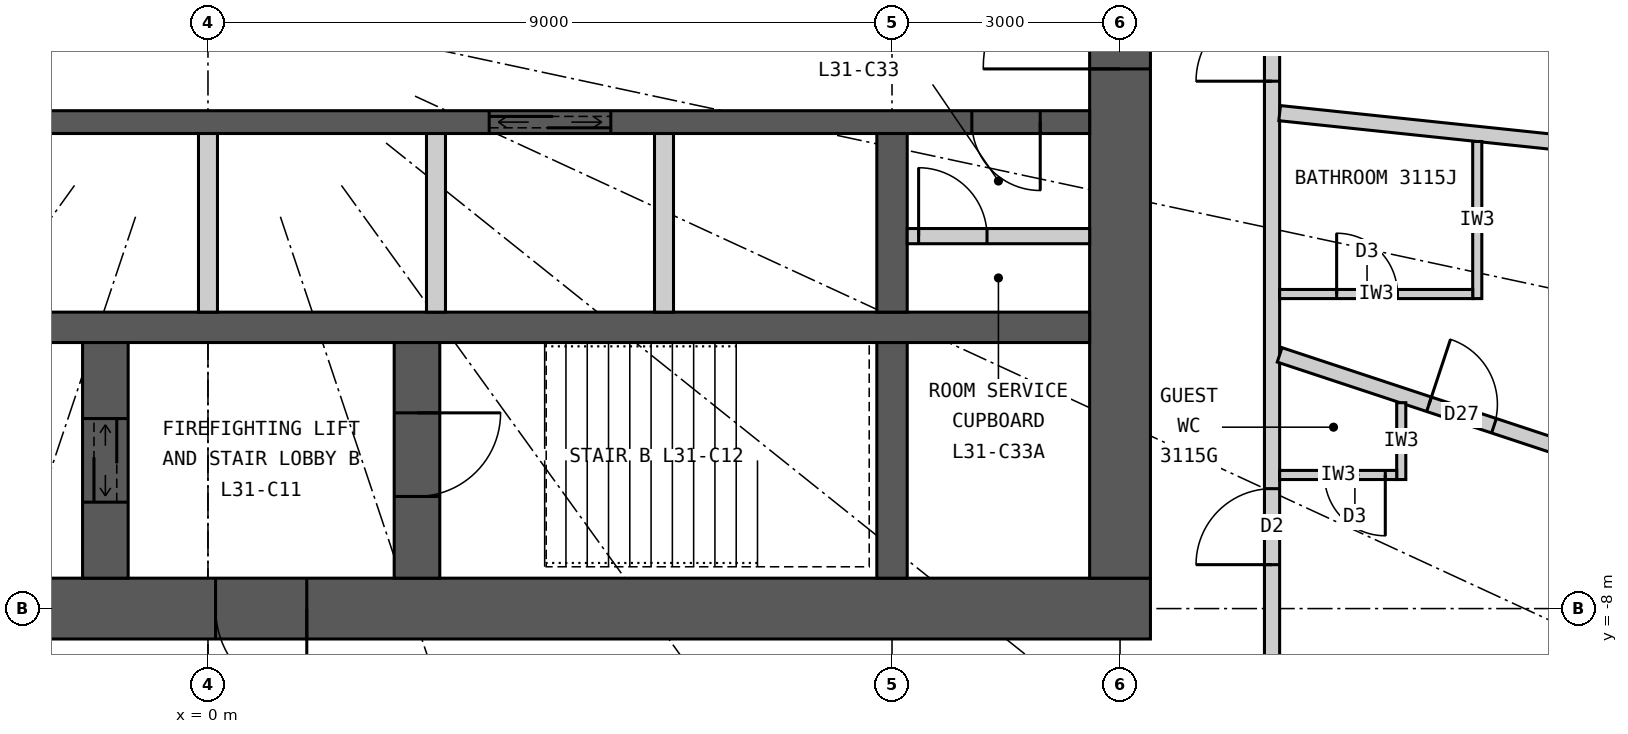
"""IFC4 building model, lengths in metres.
Left out: names, types, materials, properties, quantities, classifications, styles, units other than length and angle.
Written with IfcOpenShell. Run it as: python <this file> out.ifc"""

import sys

from ifc_helpers import new_model, si_unit, direction, frame, frame_2d, origin, place, context, subcontext, project, spatial, rectangle, extrude, element, fill, save


model = new_model("IFC4")
c1 = context("Model", 3, precision=1e-05, world=origin(), true_north=direction((0.0, 1.0)))
c2 = subcontext(c1, "Body", "Model", "MODEL_VIEW")
j1 = project(units=[si_unit("LENGTHUNIT", "METRE"), si_unit("PLANEANGLEUNIT", "RADIAN")], contexts=[c1])
p1 = place(None, origin())
s1 = spatial("IfcSite", under=j1, at=p1, CompositionType="ELEMENT")
p2 = place(p1, origin())
s2 = spatial("IfcBuilding", under=s1, at=p2, CompositionType="ELEMENT")
p3 = place(p2, frame((0.0, 0.0, 122.1)))
s3 = spatial("IfcBuildingStorey", under=s2, at=p3, CompositionType="ELEMENT", Elevation=122.1)
p4 = place(p3, frame((12.4, -8.0, 0.0), z_axis=(0.0, 0.0, 1.0), x_axis=(-1.0, 0.0, 0.0)))
e1 = element("IfcWall", 1, at=p4, inside=s3, PredefinedType="SHEAR", context=c2, shape_type="SweptSolid", body=[
    extrude(rectangle(XDim=24.8, YDim=0.8, at=frame_2d((12.4, 0.0))), origin(), (0.0, 0.0, 1.0), 3.3),
])
p5 = place(p4, frame((11.1, 0.0, 0.0)))
e2 = element("IfcOpeningElement", 2, at=p5, cuts=e1, PredefinedType="OPENING", context=c2, shape_type="SweptSolid", body=[
    extrude(rectangle(XDim=1.2, YDim=2.2, at=frame_2d((0.6, 1.1))), frame((0.0, 0.41, 0.0), z_axis=(0.0, -1.0, 0.0), x_axis=(1.0, 0.0, 0.0)), (0.0, 0.0, 1.0), 0.82),
])
p6 = place(p4, frame((18.7, 0.0, 0.0)))
e3 = element("IfcOpeningElement", 3, at=p6, cuts=e1, PredefinedType="OPENING", context=c2, shape_type="SweptSolid", body=[
    extrude(rectangle(XDim=0.9, YDim=2.2, at=frame_2d((0.45, 1.1))), frame((0.0, 0.41, 0.0), z_axis=(0.0, -1.0, 0.0), x_axis=(1.0, 0.0, 0.0)), (0.0, 0.0, 1.0), 0.82),
])
p7 = place(p3, frame((12.0, -7.6, 0.0), z_axis=(0.0, 0.0, 1.0), x_axis=(0.0, 1.0, 0.0)))
e4 = element("IfcWall", 4, at=p7, inside=s3, PredefinedType="SHEAR", context=c2, shape_type="SweptSolid", body=[
    extrude(rectangle(XDim=15.2, YDim=0.8, at=frame_2d((7.6, 0.0))), origin(), (0.0, 0.0, 1.0), 3.3),
])
p8 = place(p7, frame((6.7, 0.0, 0.0)))
e5 = element("IfcOpeningElement", 5, at=p8, cuts=e4, PredefinedType="OPENING", context=c2, shape_type="SweptSolid", body=[
    extrude(rectangle(XDim=1.8, YDim=2.2, at=frame_2d((0.9, 1.1))), frame((0.0, 0.41, 0.0), z_axis=(0.0, -1.0, 0.0), x_axis=(1.0, 0.0, 0.0)), (0.0, 0.0, 1.0), 0.82),
])
p9 = place(p3, frame((-11.6, -4.3, 0.0), z_axis=(0.0, 0.0, 1.0), x_axis=(1.0, 0.0, 0.0)))
e6 = element("IfcWall", 6, at=p9, inside=s3, PredefinedType="SHEAR", context=c2, shape_type="SweptSolid", body=[
    extrude(rectangle(XDim=23.2, YDim=0.4, at=frame_2d((11.6, 0.0))), origin(), (0.0, 0.0, 1.0), 3.3),
])
p10 = place(p3, frame((-11.6, -1.6, 0.0), z_axis=(0.0, 0.0, 1.0), x_axis=(1.0, 0.0, 0.0)))
e7 = element("IfcWall", 7, at=p10, inside=s3, PredefinedType="SHEAR", context=c2, shape_type="SweptSolid", body=[
    extrude(rectangle(XDim=23.2, YDim=0.3, at=frame_2d((11.6, 0.0))), origin(), (0.0, 0.0, 1.0), 3.3),
])
p11 = place(p10, frame((6.55, 0.0, 0.0)))
e8 = element("IfcOpeningElement", 8, at=p11, cuts=e7, PredefinedType="OPENING", context=c2, shape_type="SweptSolid", body=[
    extrude(rectangle(XDim=1.1, YDim=2.2, at=frame_2d((0.55, 1.1))), frame((0.0, 0.16, 0.0), z_axis=(0.0, -1.0, 0.0), x_axis=(1.0, 0.0, 0.0)), (0.0, 0.0, 1.0), 0.32),
])
p12 = place(p10, frame((15.3, 0.0, 0.0)))
e9 = element("IfcOpeningElement", 9, at=p12, cuts=e7, PredefinedType="OPENING", context=c2, shape_type="SweptSolid", body=[
    extrude(rectangle(XDim=1.6, YDim=2.4, at=frame_2d((0.8, 1.2))), frame((0.0, 0.16, 0.0), z_axis=(0.0, -1.0, 0.0), x_axis=(1.0, 0.0, 0.0)), (0.0, 0.0, 1.0), 0.32),
])
p13 = place(p10, frame((0.65, 0.0, 0.0)))
e10 = element("IfcOpeningElement", 10, at=p13, cuts=e7, PredefinedType="OPENING", context=c2, shape_type="SweptSolid", body=[
    extrude(rectangle(XDim=0.9, YDim=2.2, at=frame_2d((0.45, 1.1))), frame((0.0, 0.16, 0.0), z_axis=(0.0, -1.0, 0.0), x_axis=(1.0, 0.0, 0.0)), (0.0, 0.0, 1.0), 0.32),
])
p14 = place(p10, frame((3.65, 0.0, 0.0)))
e11 = element("IfcOpeningElement", 11, at=p14, cuts=e7, PredefinedType="OPENING", context=c2, shape_type="SweptSolid", body=[
    extrude(rectangle(XDim=0.9, YDim=2.2, at=frame_2d((0.45, 1.1))), frame((0.0, 0.16, 0.0), z_axis=(0.0, -1.0, 0.0), x_axis=(1.0, 0.0, 0.0)), (0.0, 0.0, 1.0), 0.32),
])
p15 = place(p10, frame((21.65, 0.0, 0.0)))
e12 = element("IfcOpeningElement", 12, at=p15, cuts=e7, PredefinedType="OPENING", context=c2, shape_type="SweptSolid", body=[
    extrude(rectangle(XDim=0.9, YDim=2.2, at=frame_2d((0.45, 1.1))), frame((0.0, 0.16, 0.0), z_axis=(0.0, -1.0, 0.0), x_axis=(1.0, 0.0, 0.0)), (0.0, 0.0, 1.0), 0.32),
])
p16 = place(p3, frame((9.0, -4.1, 0.0), z_axis=(0.0, 0.0, 1.0), x_axis=(0.0, 1.0, 0.0)))
e13 = element("IfcWall", 13, at=p16, inside=s3, PredefinedType="SHEAR", context=c2, shape_type="SweptSolid", body=[
    extrude(rectangle(XDim=2.35, YDim=0.4, at=frame_2d((1.175, 0.0))), origin(), (0.0, 0.0, 1.0), 3.3),
])
p17 = place(p3, frame((9.0, -7.6, 0.0), z_axis=(0.0, 0.0, 1.0), x_axis=(0.0, 1.0, 0.0)))
e14 = element("IfcWall", 14, at=p17, inside=s3, PredefinedType="SHEAR", context=c2, shape_type="SweptSolid", body=[
    extrude(rectangle(XDim=3.1, YDim=0.4, at=frame_2d((1.55, 0.0))), origin(), (0.0, 0.0, 1.0), 3.3),
])
p18 = place(p3, frame((2.75, -7.6, 0.0), z_axis=(0.0, 0.0, 1.0), x_axis=(0.0, 1.0, 0.0)))
e15 = element("IfcWall", 15, at=p18, inside=s3, PredefinedType="SHEAR", context=c2, shape_type="SweptSolid", body=[
    extrude(rectangle(XDim=3.1, YDim=0.6, at=frame_2d((1.55, 0.0))), origin(), (0.0, 0.0, 1.0), 3.3),
])
p19 = place(p18, frame((1.075, 0.0, 0.0)))
e16 = element("IfcOpeningElement", 16, at=p19, cuts=e15, PredefinedType="OPENING", context=c2, shape_type="SweptSolid", body=[
    extrude(rectangle(XDim=1.1, YDim=2.2, at=frame_2d((0.55, 1.1))), frame((0.0, 0.31, 0.0), z_axis=(0.0, -1.0, 0.0), x_axis=(1.0, 0.0, 0.0)), (0.0, 0.0, 1.0), 0.62),
])
p20 = place(p3, frame((-1.35, -7.6, 0.0), z_axis=(0.0, 0.0, 1.0), x_axis=(0.0, 1.0, 0.0)))
e17 = element("IfcWall", 17, at=p20, inside=s3, PredefinedType="SHEAR", context=c2, shape_type="SweptSolid", body=[
    extrude(rectangle(XDim=3.1, YDim=0.6, at=frame_2d((1.55, 0.0))), origin(), (0.0, 0.0, 1.0), 3.3),
])
p21 = place(p20, frame((1.0, 0.0, 0.0)))
e18 = element("IfcOpeningElement", 18, at=p21, cuts=e17, PredefinedType="OPENING", context=c2, shape_type="SweptSolid", body=[
    extrude(rectangle(XDim=1.1, YDim=2.2, at=frame_2d((0.55, 1.1))), frame((0.0, 0.31, 0.0), z_axis=(0.0, -1.0, 0.0), x_axis=(1.0, 0.0, 0.0)), (0.0, 0.0, 1.0), 0.62),
])
for number, where, z_axis, x_axis in (
    (19, (0.0, -4.1, 0.0), (0.0, 0.0, 1.0), (0.0, 1.0, 0.0)),
    (20, (3.0, -4.1, 0.0), (0.0, 0.0, 1.0), (0.0, 1.0, 0.0)),
    (21, (6.0, -4.1, 0.0), (0.0, 0.0, 1.0), (0.0, 1.0, 0.0)),
):
    element("IfcWall", number, at=place(p3, frame(where, z_axis=z_axis, x_axis=x_axis)), inside=s3, PredefinedType="PARTITIONING", context=c2, shape_type="SweptSolid", body=[
        extrude(rectangle(XDim=2.35, YDim=0.25, at=frame_2d((1.175, 0.0))), origin(), (0.0, 0.0, 1.0), 3.3),
    ])
p22 = place(p3, frame((14.0, -9.9, 0.0), z_axis=(0.0, 0.0, 1.0), x_axis=(0.0, 1.0, 0.0)))
e22 = element("IfcWall", 22, at=p22, inside=s3, PredefinedType="PARTITIONING", context=c2, shape_type="SweptSolid", body=[
    extrude(rectangle(XDim=19.8, YDim=0.2, at=frame_2d((9.9, 0.0))), origin(), (0.0, 0.0, 1.0), 3.12),
])
p23 = place(p22, frame((2.478, 0.0, 0.0)))
e23 = element("IfcOpeningElement", 23, at=p23, cuts=e22, PredefinedType="OPENING", context=c2, shape_type="SweptSolid", body=[
    extrude(rectangle(XDim=1.0, YDim=2.2, at=frame_2d((0.5, 1.1))), frame((0.0, 0.11, 0.0), z_axis=(0.0, -1.0, 0.0), x_axis=(1.0, 0.0, 0.0)), (0.0, 0.0, 1.0), 0.22),
])
p24 = place(p22, frame((8.838, 0.0, 0.0)))
e24 = element("IfcOpeningElement", 24, at=p24, cuts=e22, PredefinedType="OPENING", context=c2, shape_type="SweptSolid", body=[
    extrude(rectangle(XDim=1.0, YDim=2.2, at=frame_2d((0.5, 1.1))), frame((0.0, 0.11, 0.0), z_axis=(0.0, -1.0, 0.0), x_axis=(1.0, 0.0, 0.0)), (0.0, 0.0, 1.0), 0.22),
])
p25 = place(p22, frame((13.742, 0.0, 0.0)))
e25 = element("IfcOpeningElement", 25, at=p25, cuts=e22, PredefinedType="OPENING", context=c2, shape_type="SweptSolid", body=[
    extrude(rectangle(XDim=1.0, YDim=2.2, at=frame_2d((0.5, 1.1))), frame((0.0, 0.11, 0.0), z_axis=(0.0, -1.0, 0.0), x_axis=(1.0, 0.0, 0.0)), (0.0, 0.0, 1.0), 0.22),
])
p26 = place(p22, frame((18.698, 0.0, 0.0)))
e26 = element("IfcOpeningElement", 26, at=p26, cuts=e22, PredefinedType="OPENING", context=c2, shape_type="SweptSolid", body=[
    extrude(rectangle(XDim=1.0, YDim=2.2, at=frame_2d((0.5, 1.1))), frame((0.0, 0.11, 0.0), z_axis=(0.0, -1.0, 0.0), x_axis=(1.0, 0.0, 0.0)), (0.0, 0.0, 1.0), 0.22),
])
p27 = place(p3, frame((14.1, -4.662, 0.0), z_axis=(0.0, 0.0, 1.0), x_axis=(0.949446466373, -0.313928984789, 0.0)))
e27 = element("IfcWall", 27, at=p27, inside=s3, PredefinedType="PARTITIONING", context=c2, shape_type="SweptSolid", body=[
    extrude(rectangle(XDim=8.797, YDim=0.2, at=frame_2d((4.399, 0.0))), origin(), (0.0, 0.0, 1.0), 3.12),
])
p28 = place(p27, frame((2.07, 0.0, 0.0)))
e28 = element("IfcOpeningElement", 28, at=p28, cuts=e27, PredefinedType="OPENING", context=c2, shape_type="SweptSolid", body=[
    extrude(rectangle(XDim=0.9, YDim=2.1, at=frame_2d((0.45, 1.05))), frame((0.0, 0.11, 0.0), z_axis=(0.0, -1.0, 0.0), x_axis=(1.0, 0.0, 0.0)), (0.0, 0.0, 1.0), 0.22),
])
p29 = place(p3, frame((14.1, -1.482, 0.0), z_axis=(0.0, 0.0, 1.0), x_axis=(0.994523202615, -0.104516024894, 0.0)))
e29 = element("IfcWall", 29, at=p29, inside=s3, PredefinedType="PARTITIONING", context=c2, shape_type="SweptSolid", body=[
    extrude(rectangle(XDim=10.091, YDim=0.2, at=frame_2d((5.045, 0.0))), origin(), (0.0, 0.0, 1.0), 2.47),
])
p30 = place(p3, frame((15.7, -5.291, 0.0), z_axis=(0.0, 0.0, 1.0), x_axis=(0.0, -1.0, 0.0)))
e30 = element("IfcWall", 30, at=p30, inside=s3, PredefinedType="PARTITIONING", context=c2, shape_type="SweptSolid", body=[
    extrude(rectangle(XDim=1.011, YDim=0.12, at=frame_2d((0.505, 0.0))), origin(), (0.0, 0.0, 1.0), 3.12),
])
p31 = place(p3, frame((14.1, -6.242, 0.0), z_axis=(0.0, 0.0, 1.0), x_axis=(1.0, 0.0, 0.0)))
e31 = element("IfcWall", 31, at=p31, inside=s3, PredefinedType="PARTITIONING", context=c2, shape_type="SweptSolid", body=[
    extrude(rectangle(XDim=1.54, YDim=0.12, at=frame_2d((0.77, 0.0))), origin(), (0.0, 0.0, 1.0), 3.12),
])
p32 = place(p31, frame((0.59, 0.0, 0.0)))
e32 = element("IfcOpeningElement", 32, at=p32, cuts=e31, PredefinedType="OPENING", context=c2, shape_type="SweptSolid", body=[
    extrude(rectangle(XDim=0.8, YDim=2.1, at=frame_2d((0.4, 1.05))), frame((0.0, 0.07, 0.0), z_axis=(0.0, -1.0, 0.0), x_axis=(1.0, 0.0, 0.0)), (0.0, 0.0, 1.0), 0.14),
])
p33 = place(p3, frame((16.7, -1.855, 0.0), z_axis=(0.0, 0.0, 1.0), x_axis=(0.0, -1.0, 0.0)))
e33 = element("IfcWall", 33, at=p33, inside=s3, PredefinedType="PARTITIONING", context=c2, shape_type="SweptSolid", body=[
    extrude(rectangle(XDim=2.067, YDim=0.12, at=frame_2d((1.033, 0.0))), origin(), (0.0, 0.0, 1.0), 3.12),
])
p34 = place(p3, frame((14.1, -3.862, 0.0), z_axis=(0.0, 0.0, 1.0), x_axis=(1.0, 0.0, 0.0)))
e34 = element("IfcWall", 34, at=p34, inside=s3, PredefinedType="PARTITIONING", context=c2, shape_type="SweptSolid", body=[
    extrude(rectangle(XDim=2.54, YDim=0.12, at=frame_2d((1.27, 0.0))), origin(), (0.0, 0.0, 1.0), 2.37),
])
p35 = place(p34, frame((0.75, 0.0, 0.0)))
e35 = element("IfcOpeningElement", 35, at=p35, cuts=e34, PredefinedType="OPENING", context=c2, shape_type="SweptSolid", body=[
    extrude(rectangle(XDim=0.8, YDim=2.1, at=frame_2d((0.4, 1.05))), frame((0.0, 0.07, 0.0), z_axis=(0.0, -1.0, 0.0), x_axis=(1.0, 0.0, 0.0)), (0.0, 0.0, 1.0), 0.14),
])
p36 = place(p3, frame((9.2, -3.1, 0.0), z_axis=(0.0, 0.0, 1.0), x_axis=(1.0, 0.0, 0.0)))
e36 = element("IfcWall", 36, at=p36, inside=s3, PredefinedType="PARTITIONING", context=c2, shape_type="SweptSolid", body=[
    extrude(rectangle(XDim=2.4, YDim=0.2, at=frame_2d((1.2, 0.0))), origin(), (0.0, 0.0, 1.0), 3.12),
])
p37 = place(p36, frame((0.15, 0.0, 0.0)))
e37 = element("IfcOpeningElement", 37, at=p37, cuts=e36, PredefinedType="OPENING", context=c2, shape_type="SweptSolid", body=[
    extrude(rectangle(XDim=0.9, YDim=2.2, at=frame_2d((0.45, 1.1))), frame((0.0, 0.11, 0.0), z_axis=(0.0, -1.0, 0.0), x_axis=(1.0, 0.0, 0.0)), (0.0, 0.0, 1.0), 0.22),
])
p38 = place(p32, origin())
e38 = element("IfcDoor", 38, at=p38, inside=s3, OperationType="SINGLE_SWING_RIGHT", PredefinedType="DOOR", context=c2, shape_type="SweptSolid", body=[
    extrude(rectangle(XDim=0.8, YDim=2.1, at=frame_2d((0.4, 1.05))), frame((0.0, 0.025, 0.0), z_axis=(0.0, -1.0, 0.0), x_axis=(1.0, 0.0, 0.0)), (0.0, 0.0, 1.0), 0.05),
])
fill(e32, e38)
p39 = place(p23, origin())
e39 = element("IfcDoor", 39, at=p39, inside=s3, OperationType="SINGLE_SWING_LEFT", PredefinedType="DOOR", context=c2, shape_type="SweptSolid", body=[
    extrude(rectangle(XDim=1.0, YDim=2.2, at=frame_2d((0.5, 1.1))), frame((0.0, 0.025, 0.0), z_axis=(0.0, -1.0, 0.0), x_axis=(1.0, 0.0, 0.0)), (0.0, 0.0, 1.0), 0.05),
])
fill(e23, e39)
p40 = place(p35, origin())
e40 = element("IfcDoor", 40, at=p40, inside=s3, OperationType="SINGLE_SWING_LEFT", PredefinedType="DOOR", context=c2, shape_type="SweptSolid", body=[
    extrude(rectangle(XDim=0.8, YDim=2.1, at=frame_2d((0.4, 1.05))), frame((0.0, 0.025, 0.0), z_axis=(0.0, -1.0, 0.0), x_axis=(1.0, 0.0, 0.0)), (0.0, 0.0, 1.0), 0.05),
])
fill(e35, e40)
p41 = place(p28, origin())
e41 = element("IfcDoor", 41, at=p41, inside=s3, OperationType="SINGLE_SWING_LEFT", PredefinedType="DOOR", context=c2, shape_type="SweptSolid", body=[
    extrude(rectangle(XDim=0.9, YDim=2.1, at=frame_2d((0.45, 1.05))), frame((0.0, 0.025, 0.0), z_axis=(0.0, -1.0, 0.0), x_axis=(1.0, 0.0, 0.0)), (0.0, 0.0, 1.0), 0.05),
])
fill(e28, e41)
p42 = place(p24, origin())
e42 = element("IfcDoor", 42, at=p42, inside=s3, OperationType="SINGLE_SWING_LEFT", PredefinedType="DOOR", context=c2, shape_type="SweptSolid", body=[
    extrude(rectangle(XDim=1.0, YDim=2.2, at=frame_2d((0.5, 1.1))), frame((0.0, 0.025, 0.0), z_axis=(0.0, -1.0, 0.0), x_axis=(1.0, 0.0, 0.0)), (0.0, 0.0, 1.0), 0.05),
])
fill(e24, e42)
p43 = place(p5, origin())
e43 = element("IfcDoor", 43, at=p43, inside=s3, OperationType="SINGLE_SWING_LEFT", PredefinedType="DOOR", context=c2, shape_type="SweptSolid", body=[
    extrude(rectangle(XDim=1.2, YDim=2.2, at=frame_2d((0.6, 1.1))), frame((0.0, 0.025, 0.0), z_axis=(0.0, -1.0, 0.0), x_axis=(1.0, 0.0, 0.0)), (0.0, 0.0, 1.0), 0.05),
])
fill(e2, e43)
p44 = place(p19, origin())
e44 = element("IfcDoor", 44, at=p44, inside=s3, OperationType="SINGLE_SWING_RIGHT", PredefinedType="DOOR", context=c2, shape_type="SweptSolid", body=[
    extrude(rectangle(XDim=1.1, YDim=2.2, at=frame_2d((0.55, 1.1))), frame((0.0, 0.025, 0.0), z_axis=(0.0, -1.0, 0.0), x_axis=(1.0, 0.0, 0.0)), (0.0, 0.0, 1.0), 0.05),
])
fill(e16, e44)
p45 = place(p21, origin())
e45 = element("IfcDoor", 45, at=p45, inside=s3, OperationType="DOUBLE_DOOR_SLIDING", PredefinedType="DOOR", context=c2, shape_type="SweptSolid", body=[
    extrude(rectangle(XDim=1.1, YDim=2.2, at=frame_2d((0.55, 1.1))), frame((0.0, 0.025, 0.0), z_axis=(0.0, -1.0, 0.0), x_axis=(1.0, 0.0, 0.0)), (0.0, 0.0, 1.0), 0.05),
])
fill(e18, e45)
p46 = place(p12, origin())
e46 = element("IfcDoor", 46, at=p46, inside=s3, OperationType="DOUBLE_DOOR_SLIDING", PredefinedType="DOOR", context=c2, shape_type="SweptSolid", body=[
    extrude(rectangle(XDim=1.6, YDim=2.4, at=frame_2d((0.8, 1.2))), frame((0.0, 0.025, 0.0), z_axis=(0.0, -1.0, 0.0), x_axis=(1.0, 0.0, 0.0)), (0.0, 0.0, 1.0), 0.05),
])
fill(e9, e46)
p47 = place(p15, origin())
e47 = element("IfcDoor", 47, at=p47, inside=s3, OperationType="SINGLE_SWING_RIGHT", PredefinedType="DOOR", context=c2, shape_type="SweptSolid", body=[
    extrude(rectangle(XDim=0.9, YDim=2.2, at=frame_2d((0.45, 1.1))), frame((0.0, 0.025, 0.0), z_axis=(0.0, -1.0, 0.0), x_axis=(1.0, 0.0, 0.0)), (0.0, 0.0, 1.0), 0.05),
])
fill(e12, e47)
p48 = place(p37, origin())
e48 = element("IfcDoor", 48, at=p48, inside=s3, OperationType="SINGLE_SWING_LEFT", PredefinedType="DOOR", context=c2, shape_type="SweptSolid", body=[
    extrude(rectangle(XDim=0.9, YDim=2.2, at=frame_2d((0.45, 1.1))), frame((0.0, 0.025, 0.0), z_axis=(0.0, -1.0, 0.0), x_axis=(1.0, 0.0, 0.0)), (0.0, 0.0, 1.0), 0.05),
])
fill(e37, e48)
p49 = place(p8, origin())
e49 = element("IfcDoor", 49, at=p49, inside=s3, OperationType="DOUBLE_DOOR_DOUBLE_SWING", PredefinedType="DOOR", context=c2, shape_type="SweptSolid", body=[
    extrude(rectangle(XDim=1.8, YDim=2.2, at=frame_2d((0.9, 1.1))), frame((0.0, 0.025, 0.0), z_axis=(0.0, -1.0, 0.0), x_axis=(1.0, 0.0, 0.0)), (0.0, 0.0, 1.0), 0.05),
])
fill(e5, e49)
save(model, sys.argv[1])
